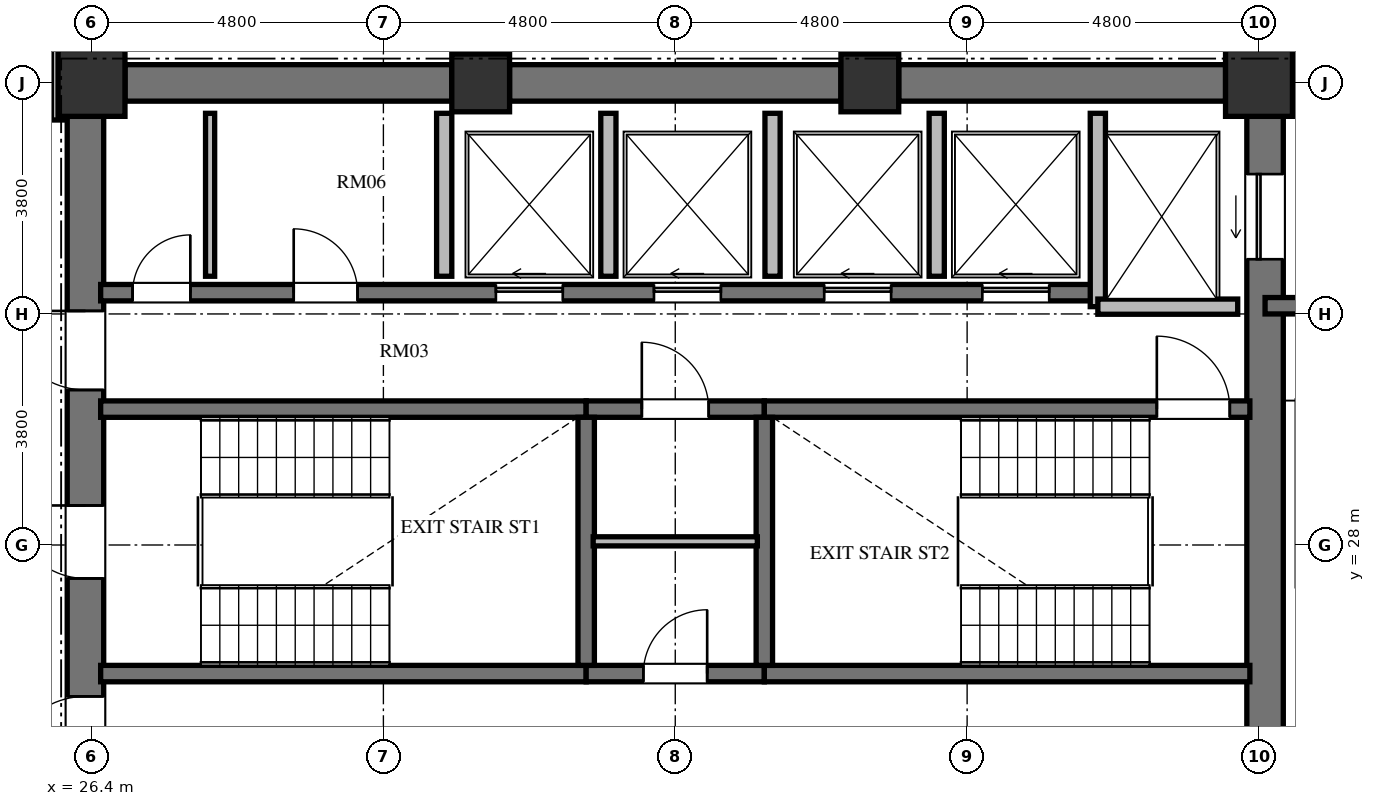
"""IFC4 building model, lengths in metres.
Left out: names, types, materials, properties, quantities, classifications, styles, units other than length and angle.
Written with IfcOpenShell. Run it as: python <this file> out.ifc"""

import sys

from ifc_helpers import new_model, si_unit, direction, frame, frame_2d, origin, origin_2d, place, context, subcontext, project, spatial, rectangle, extrude, element, fill, save


model = new_model("IFC4")
c1 = context("Model", 3, precision=1e-05, world=origin(), true_north=direction((0.0, 1.0)))
c2 = subcontext(c1, "Body", "Model", "MODEL_VIEW")
j1 = project(units=[si_unit("LENGTHUNIT", "METRE"), si_unit("PLANEANGLEUNIT", "RADIAN")], contexts=[c1])
p1 = place(None, origin())
s1 = spatial("IfcSite", under=j1, at=p1, CompositionType="ELEMENT")
p2 = place(p1, origin())
s2 = spatial("IfcBuilding", under=s1, at=p2, CompositionType="ELEMENT")
p3 = place(p2, frame((0.0, 0.0, 156.528)))
s3 = spatial("IfcBuildingStorey", under=s2, at=p3, CompositionType="ELEMENT", Elevation=156.528)
p4 = place(p3, frame((45.6, 35.6, 0.0), z_axis=(0.0, 0.0, 1.0), x_axis=(1.0, 0.0, 0.0)))
e1 = element("IfcColumn", 1, at=p4, inside=s3, PredefinedType="COLUMN", context=c2, shape_type="SweptSolid", body=[
    extrude(rectangle(XDim=1.1, YDim=1.1, at=origin_2d()), origin(), (0.0, 0.0, 1.0), 3.648),
])
for number, where, z_axis, x_axis in (
    (2, (39.2, 35.6, 0.0), (0.0, 0.0, 1.0), (1.0, 0.0, 0.0)),
    (3, (32.8, 35.6, 0.0), (0.0, 0.0, 1.0), (1.0, 0.0, 0.0)),
):
    element("IfcColumn", number, at=place(p3, frame(where, z_axis=z_axis, x_axis=x_axis)), inside=s3, PredefinedType="COLUMN", context=c2, shape_type="SweptSolid", body=[
        extrude(rectangle(XDim=0.95, YDim=0.95, at=origin_2d()), origin(), (0.0, 0.0, 1.0), 3.648),
    ])
p5 = place(p3, frame((26.4, 35.6, 0.0), z_axis=(0.0, 0.0, 1.0), x_axis=(1.0, 0.0, 0.0)))
e4 = element("IfcColumn", 4, at=p5, inside=s3, PredefinedType="COLUMN", context=c2, shape_type="SweptSolid", body=[
    extrude(rectangle(XDim=1.1, YDim=1.1, at=origin_2d()), origin(), (0.0, 0.0, 1.0), 3.648),
])
p6 = place(p3, frame((26.3, 20.95, 0.0), z_axis=(0.0, 0.0, 1.0), x_axis=(0.0, 1.0, 0.0)))
e5 = element("IfcWall", 5, at=p6, inside=s3, PredefinedType="SHEAR", context=c2, shape_type="SweptSolid", body=[
    extrude(rectangle(XDim=14.1, YDim=0.6, at=frame_2d((7.05, 0.0))), origin(), (0.0, 0.0, 1.0), 3.648),
])
p7 = place(p6, frame((6.5, 0.0, 0.0)))
e6 = element("IfcOpeningElement", 6, at=p7, cuts=e5, PredefinedType="OPENING", context=c2, shape_type="SweptSolid", body=[
    extrude(rectangle(XDim=1.2, YDim=2.15, at=frame_2d((0.6, 1.075))), frame((0.0, 0.31, 0.0), z_axis=(0.0, -1.0, 0.0), x_axis=(1.0, 0.0, 0.0)), (0.0, 0.0, 1.0), 0.62),
])
p8 = place(p6, frame((9.6, 0.0, 0.0)))
e7 = element("IfcOpeningElement", 7, at=p8, cuts=e5, PredefinedType="OPENING", context=c2, shape_type="SweptSolid", body=[
    extrude(rectangle(XDim=1.3, YDim=2.2, at=frame_2d((0.65, 1.1))), frame((0.0, 0.31, 0.0), z_axis=(0.0, -1.0, 0.0), x_axis=(1.0, 0.0, 0.0)), (0.0, 0.0, 1.0), 0.62),
])
p9 = place(p6, frame((3.26, 0.0, 0.0)))
e8 = element("IfcOpeningElement", 8, at=p9, cuts=e5, PredefinedType="OPENING", context=c2, shape_type="SweptSolid", body=[
    extrude(rectangle(XDim=1.3, YDim=2.2, at=frame_2d((0.65, 1.1))), frame((0.0, 0.31, 0.0), z_axis=(0.0, -1.0, 0.0), x_axis=(1.0, 0.0, 0.0)), (0.0, 0.0, 1.0), 0.62),
])
p10 = place(p3, frame((45.7, 20.95, 0.0), z_axis=(0.0, 0.0, 1.0), x_axis=(0.0, 1.0, 0.0)))
e9 = element("IfcWall", 9, at=p10, inside=s3, PredefinedType="SHEAR", context=c2, shape_type="SweptSolid", body=[
    extrude(rectangle(XDim=14.1, YDim=0.6, at=frame_2d((7.05, 0.0))), origin(), (0.0, 0.0, 1.0), 3.648),
])
p11 = place(p10, frame((11.75, 0.0, 0.0)))
e10 = element("IfcOpeningElement", 10, at=p11, cuts=e9, PredefinedType="OPENING", context=c2, shape_type="SweptSolid", body=[
    extrude(rectangle(XDim=1.4, YDim=2.3, at=frame_2d((0.7, 1.15))), frame((0.0, 0.31, 0.0), z_axis=(0.0, -1.0, 0.0), x_axis=(1.0, 0.0, 0.0)), (0.0, 0.0, 1.0), 0.62),
])
p12 = place(p10, frame((0.95, 0.0, 0.0)))
e11 = element("IfcOpeningElement", 11, at=p12, cuts=e9, PredefinedType="OPENING", context=c2, shape_type="SweptSolid", body=[
    extrude(rectangle(XDim=1.4, YDim=2.3, at=frame_2d((0.7, 1.15))), frame((0.0, 0.31, 0.0), z_axis=(0.0, -1.0, 0.0), x_axis=(1.0, 0.0, 0.0)), (0.0, 0.0, 1.0), 0.62),
])
p13 = place(p3, frame((26.95, 35.6, 0.0), z_axis=(0.0, 0.0, 1.0), x_axis=(1.0, 0.0, 0.0)))
e12 = element("IfcWall", 12, at=p13, inside=s3, PredefinedType="SHEAR", context=c2, shape_type="SweptSolid", body=[
    extrude(rectangle(XDim=5.375, YDim=0.6, at=frame_2d((2.688, 0.0))), origin(), (0.0, 0.0, 1.0), 3.648),
])
p14 = place(p3, frame((33.275, 35.6, 0.0), z_axis=(0.0, 0.0, 1.0), x_axis=(1.0, 0.0, 0.0)))
e13 = element("IfcWall", 13, at=p14, inside=s3, PredefinedType="SHEAR", context=c2, shape_type="SweptSolid", body=[
    extrude(rectangle(XDim=5.45, YDim=0.6, at=frame_2d((2.725, 0.0))), origin(), (0.0, 0.0, 1.0), 3.648),
])
p15 = place(p3, frame((39.675, 35.6, 0.0), z_axis=(0.0, 0.0, 1.0), x_axis=(1.0, 0.0, 0.0)))
e14 = element("IfcWall", 14, at=p15, inside=s3, PredefinedType="SHEAR", context=c2, shape_type="SweptSolid", body=[
    extrude(rectangle(XDim=5.375, YDim=0.6, at=frame_2d((2.688, 0.0))), origin(), (0.0, 0.0, 1.0), 3.648),
])
p16 = place(p3, frame((26.55, 30.235, 0.0), z_axis=(0.0, 0.0, 1.0), x_axis=(1.0, 0.0, 0.0)))
e15 = element("IfcWall", 15, at=p16, inside=s3, PredefinedType="SHEAR", context=c2, shape_type="SweptSolid", body=[
    extrude(rectangle(XDim=7.985, YDim=0.27, at=frame_2d((3.992, 0.0))), origin(), (0.0, 0.0, 1.0), 3.648),
])
p17 = place(p3, frame((34.535, 30.235, 0.0), z_axis=(0.0, 0.0, 1.0), x_axis=(1.0, 0.0, 0.0)))
e16 = element("IfcWall", 16, at=p17, inside=s3, PredefinedType="SHEAR", context=c2, shape_type="SweptSolid", body=[
    extrude(rectangle(XDim=2.93, YDim=0.27, at=frame_2d((1.465, 0.0))), origin(), (0.0, 0.0, 1.0), 3.648),
])
p18 = place(p17, frame((0.915, 0.0, 0.0)))
e17 = element("IfcOpeningElement", 17, at=p18, cuts=e16, PredefinedType="OPENING", context=c2, shape_type="SweptSolid", body=[
    extrude(rectangle(XDim=1.1, YDim=2.15, at=frame_2d((0.55, 1.075))), frame((0.0, 0.145, 0.0), z_axis=(0.0, -1.0, 0.0), x_axis=(1.0, 0.0, 0.0)), (0.0, 0.0, 1.0), 0.29),
])
p19 = place(p3, frame((37.465, 30.235, 0.0), z_axis=(0.0, 0.0, 1.0), x_axis=(1.0, 0.0, 0.0)))
e18 = element("IfcWall", 18, at=p19, inside=s3, PredefinedType="SHEAR", context=c2, shape_type="SweptSolid", body=[
    extrude(rectangle(XDim=7.985, YDim=0.27, at=frame_2d((3.992, 0.0))), origin(), (0.0, 0.0, 1.0), 3.648),
])
p20 = place(p19, frame((6.455, 0.0, 0.0)))
e19 = element("IfcOpeningElement", 19, at=p20, cuts=e18, PredefinedType="OPENING", context=c2, shape_type="SweptSolid", body=[
    extrude(rectangle(XDim=1.2, YDim=2.15, at=frame_2d((0.6, 1.075))), frame((0.0, 0.145, 0.0), z_axis=(0.0, -1.0, 0.0), x_axis=(1.0, 0.0, 0.0)), (0.0, 0.0, 1.0), 0.29),
])
p21 = place(p3, frame((26.55, 25.885, 0.0), z_axis=(0.0, 0.0, 1.0), x_axis=(1.0, 0.0, 0.0)))
e20 = element("IfcWall", 20, at=p21, inside=s3, PredefinedType="SHEAR", context=c2, shape_type="SweptSolid", body=[
    extrude(rectangle(XDim=7.985, YDim=0.27, at=frame_2d((3.992, 0.0))), origin(), (0.0, 0.0, 1.0), 3.648),
])
p22 = place(p3, frame((34.535, 25.885, 0.0), z_axis=(0.0, 0.0, 1.0), x_axis=(1.0, 0.0, 0.0)))
e21 = element("IfcWall", 21, at=p22, inside=s3, PredefinedType="SHEAR", context=c2, shape_type="SweptSolid", body=[
    extrude(rectangle(XDim=2.93, YDim=0.27, at=frame_2d((1.465, 0.0))), origin(), (0.0, 0.0, 1.0), 3.648),
])
p23 = place(p22, frame((0.94, 0.0, 0.0)))
e22 = element("IfcOpeningElement", 22, at=p23, cuts=e21, PredefinedType="OPENING", context=c2, shape_type="SweptSolid", body=[
    extrude(rectangle(XDim=1.05, YDim=2.15, at=frame_2d((0.525, 1.075))), frame((0.0, 0.145, 0.0), z_axis=(0.0, -1.0, 0.0), x_axis=(1.0, 0.0, 0.0)), (0.0, 0.0, 1.0), 0.29),
])
p24 = place(p3, frame((37.465, 25.885, 0.0), z_axis=(0.0, 0.0, 1.0), x_axis=(1.0, 0.0, 0.0)))
e23 = element("IfcWall", 23, at=p24, inside=s3, PredefinedType="SHEAR", context=c2, shape_type="SweptSolid", body=[
    extrude(rectangle(XDim=7.985, YDim=0.27, at=frame_2d((3.992, 0.0))), origin(), (0.0, 0.0, 1.0), 3.648),
])
for number, where, z_axis, x_axis in (
    (24, (34.535, 26.02, 0.0), (0.0, 0.0, 1.0), (0.0, 1.0, 0.0)),
    (25, (37.465, 26.02, 0.0), (0.0, 0.0, 1.0), (0.0, 1.0, 0.0)),
):
    element("IfcWall", number, at=place(p3, frame(where, z_axis=z_axis, x_axis=x_axis)), inside=s3, PredefinedType="SHEAR", context=c2, shape_type="SweptSolid", body=[
        extrude(rectangle(XDim=4.08, YDim=0.27, at=frame_2d((2.04, 0.0))), origin(), (0.0, 0.0, 1.0), 3.648),
    ])
p25 = place(p3, frame((34.65, 28.06, 0.0), z_axis=(0.0, 0.0, 1.0), x_axis=(1.0, 0.0, 0.0)))
e26 = element("IfcWall", 26, at=p25, inside=s3, PredefinedType="PARTITIONING", context=c2, shape_type="SweptSolid", body=[
    extrude(rectangle(XDim=2.7, YDim=0.15, at=frame_2d((1.35, 0.0))), origin(), (0.0, 0.0, 1.0), 3.428),
])
p26 = place(p3, frame((26.55, 32.15, 0.0), z_axis=(0.0, 0.0, 1.0), x_axis=(1.0, 0.0, 0.0)))
e27 = element("IfcWall", 27, at=p26, inside=s3, PredefinedType="SHEAR", context=c2, shape_type="SweptSolid", body=[
    extrude(rectangle(XDim=16.4, YDim=0.27, at=frame_2d((8.2, 0.0))), origin(), (0.0, 0.0, 1.0), 3.648),
])
p27 = place(p26, frame((0.525, 0.0, 0.0)))
e28 = element("IfcOpeningElement", 28, at=p27, cuts=e27, PredefinedType="OPENING", context=c2, shape_type="SweptSolid", body=[
    extrude(rectangle(XDim=0.95, YDim=2.1, at=frame_2d((0.475, 1.05))), frame((0.0, 0.145, 0.0), z_axis=(0.0, -1.0, 0.0), x_axis=(1.0, 0.0, 0.0)), (0.0, 0.0, 1.0), 0.29),
])
p28 = place(p26, frame((3.175, 0.0, 0.0)))
e29 = element("IfcOpeningElement", 29, at=p28, cuts=e27, PredefinedType="OPENING", context=c2, shape_type="SweptSolid", body=[
    extrude(rectangle(XDim=1.05, YDim=2.15, at=frame_2d((0.525, 1.075))), frame((0.0, 0.145, 0.0), z_axis=(0.0, -1.0, 0.0), x_axis=(1.0, 0.0, 0.0)), (0.0, 0.0, 1.0), 0.29),
])
p29 = place(p26, frame((6.5, 0.0, 0.0)))
e30 = element("IfcOpeningElement", 30, at=p29, cuts=e27, PredefinedType="OPENING", context=c2, shape_type="SweptSolid", body=[
    extrude(rectangle(XDim=1.1, YDim=2.2, at=frame_2d((0.55, 1.1))), frame((0.0, 0.145, 0.0), z_axis=(0.0, -1.0, 0.0), x_axis=(1.0, 0.0, 0.0)), (0.0, 0.0, 1.0), 0.29),
])
p30 = place(p26, frame((9.1, 0.0, 0.0)))
e31 = element("IfcOpeningElement", 31, at=p30, cuts=e27, PredefinedType="OPENING", context=c2, shape_type="SweptSolid", body=[
    extrude(rectangle(XDim=1.1, YDim=2.2, at=frame_2d((0.55, 1.1))), frame((0.0, 0.145, 0.0), z_axis=(0.0, -1.0, 0.0), x_axis=(1.0, 0.0, 0.0)), (0.0, 0.0, 1.0), 0.29),
])
p31 = place(p26, frame((11.9, 0.0, 0.0)))
e32 = element("IfcOpeningElement", 32, at=p31, cuts=e27, PredefinedType="OPENING", context=c2, shape_type="SweptSolid", body=[
    extrude(rectangle(XDim=1.1, YDim=2.2, at=frame_2d((0.55, 1.1))), frame((0.0, 0.145, 0.0), z_axis=(0.0, -1.0, 0.0), x_axis=(1.0, 0.0, 0.0)), (0.0, 0.0, 1.0), 0.29),
])
p32 = place(p26, frame((14.5, 0.0, 0.0)))
e33 = element("IfcOpeningElement", 33, at=p32, cuts=e27, PredefinedType="OPENING", context=c2, shape_type="SweptSolid", body=[
    extrude(rectangle(XDim=1.1, YDim=2.2, at=frame_2d((0.55, 1.1))), frame((0.0, 0.145, 0.0), z_axis=(0.0, -1.0, 0.0), x_axis=(1.0, 0.0, 0.0)), (0.0, 0.0, 1.0), 0.29),
])
p33 = place(p3, frame((42.95, 31.92, 0.0), z_axis=(0.0, 0.0, 1.0), x_axis=(0.0, 1.0, 0.0)))
e34 = element("IfcWall", 34, at=p33, inside=s3, PredefinedType="SOLIDWALL", context=c2, shape_type="SweptSolid", body=[
    extrude(rectangle(XDim=3.18, YDim=0.25, at=frame_2d((1.59, 0.0))), origin(), (0.0, 0.0, 1.0), 3.428),
])
p34 = place(p3, frame((42.95, 31.92, 0.0), z_axis=(0.0, 0.0, 1.0), x_axis=(1.0, 0.0, 0.0)))
e35 = element("IfcWall", 35, at=p34, inside=s3, PredefinedType="SOLIDWALL", context=c2, shape_type="SweptSolid", body=[
    extrude(rectangle(XDim=2.3, YDim=0.25, at=frame_2d((1.15, 0.0))), origin(), (0.0, 0.0, 1.0), 3.428),
])
for number, where, z_axis, x_axis in (
    (36, (32.2, 32.42, 0.0), (0.0, 0.0, 1.0), (0.0, 1.0, 0.0)),
    (37, (34.9, 32.42, 0.0), (0.0, 0.0, 1.0), (0.0, 1.0, 0.0)),
    (38, (37.6, 32.42, 0.0), (0.0, 0.0, 1.0), (0.0, 1.0, 0.0)),
    (39, (40.3, 32.42, 0.0), (0.0, 0.0, 1.0), (0.0, 1.0, 0.0)),
):
    element("IfcWall", number, at=place(p3, frame(where, z_axis=z_axis, x_axis=x_axis)), inside=s3, PredefinedType="SOLIDWALL", context=c2, shape_type="SweptSolid", body=[
        extrude(rectangle(XDim=2.68, YDim=0.25, at=frame_2d((1.34, 0.0))), origin(), (0.0, 0.0, 1.0), 3.428),
    ])
p35 = place(p3, frame((28.35, 32.42, 0.0), z_axis=(0.0, 0.0, 1.0), x_axis=(0.0, 1.0, 0.0)))
e40 = element("IfcWall", 40, at=p35, inside=s3, PredefinedType="PARTITIONING", context=c2, shape_type="SweptSolid", body=[
    extrude(rectangle(XDim=2.68, YDim=0.15, at=frame_2d((1.34, 0.0))), origin(), (0.0, 0.0, 1.0), 3.428),
])
p36 = place(p3, frame((46.0, 35.98, 0.0), z_axis=(0.0, 0.0, 1.0), x_axis=(1.0, 0.0, 0.0)))
e41 = element("IfcWall", 41, at=p36, inside=s3, PredefinedType="SHEAR", context=c2, shape_type="SweptSolid", body=[
    extrude(rectangle(XDim=4.55, YDim=0.27, at=frame_2d((2.275, 0.0))), origin(), (0.0, 0.0, 1.0), 3.648),
])
p37 = place(p3, frame((45.7, 31.935, 0.0), z_axis=(0.0, 0.0, 1.0), x_axis=(1.0, 0.0, 0.0)))
e42 = element("IfcWall", 42, at=p37, inside=s3, PredefinedType="SHEAR", context=c2, shape_type="SweptSolid", body=[
    extrude(rectangle(XDim=4.715, YDim=0.27, at=frame_2d((2.357, 0.0))), origin(), (0.0, 0.0, 1.0), 3.648),
])
p38 = place(p3, frame((25.83, 36.21, 0.0), z_axis=(0.0, 0.0, 1.0), x_axis=(0.0, -1.0, 0.0)))
e43 = element("IfcWall", 43, at=p38, inside=s3, PredefinedType="PARTITIONING", context=c2, shape_type="SweptSolid", body=[
    extrude(rectangle(XDim=1.22, YDim=0.18, at=frame_2d((0.61, 0.0))), origin(), (0.0, 0.0, 1.0), 3.428),
])
p39 = place(p7, origin())
e44 = element("IfcDoor", 44, at=p39, inside=s3, OperationType="SINGLE_SWING_RIGHT", PredefinedType="DOOR", context=c2, shape_type="SweptSolid", body=[
    extrude(rectangle(XDim=1.2, YDim=2.15, at=frame_2d((0.6, 1.075))), frame((0.0, 0.025, 0.0), z_axis=(0.0, -1.0, 0.0), x_axis=(1.0, 0.0, 0.0)), (0.0, 0.0, 1.0), 0.05),
])
fill(e6, e44)
p40 = place(p20, origin())
e45 = element("IfcDoor", 45, at=p40, inside=s3, OperationType="SINGLE_SWING_LEFT", PredefinedType="DOOR", context=c2, shape_type="SweptSolid", body=[
    extrude(rectangle(XDim=1.2, YDim=2.15, at=frame_2d((0.6, 1.075))), frame((0.0, 0.025, 0.0), z_axis=(0.0, -1.0, 0.0), x_axis=(1.0, 0.0, 0.0)), (0.0, 0.0, 1.0), 0.05),
])
fill(e19, e45)
p41 = place(p23, origin())
e46 = element("IfcDoor", 46, at=p41, inside=s3, OperationType="SINGLE_SWING_RIGHT", PredefinedType="DOOR", context=c2, shape_type="SweptSolid", body=[
    extrude(rectangle(XDim=1.05, YDim=2.15, at=frame_2d((0.525, 1.075))), frame((0.0, 0.025, 0.0), z_axis=(0.0, -1.0, 0.0), x_axis=(1.0, 0.0, 0.0)), (0.0, 0.0, 1.0), 0.05),
])
fill(e22, e46)
p42 = place(p18, origin())
e47 = element("IfcDoor", 47, at=p42, inside=s3, OperationType="SINGLE_SWING_LEFT", PredefinedType="DOOR", context=c2, shape_type="SweptSolid", body=[
    extrude(rectangle(XDim=1.1, YDim=2.15, at=frame_2d((0.55, 1.075))), frame((0.0, 0.025, 0.0), z_axis=(0.0, -1.0, 0.0), x_axis=(1.0, 0.0, 0.0)), (0.0, 0.0, 1.0), 0.05),
])
fill(e17, e47)
p43 = place(p8, origin())
e48 = element("IfcDoor", 48, at=p43, inside=s3, OperationType="SINGLE_SWING_RIGHT", PredefinedType="DOOR", context=c2, shape_type="SweptSolid", body=[
    extrude(rectangle(XDim=1.3, YDim=2.2, at=frame_2d((0.65, 1.1))), frame((0.0, 0.025, 0.0), z_axis=(0.0, -1.0, 0.0), x_axis=(1.0, 0.0, 0.0)), (0.0, 0.0, 1.0), 0.05),
])
fill(e7, e48)
p44 = place(p9, origin())
e49 = element("IfcDoor", 49, at=p44, inside=s3, OperationType="SINGLE_SWING_LEFT", PredefinedType="DOOR", context=c2, shape_type="SweptSolid", body=[
    extrude(rectangle(XDim=1.3, YDim=2.2, at=frame_2d((0.65, 1.1))), frame((0.0, 0.025, 0.0), z_axis=(0.0, -1.0, 0.0), x_axis=(1.0, 0.0, 0.0)), (0.0, 0.0, 1.0), 0.05),
])
fill(e8, e49)
p45 = place(p27, origin())
e50 = element("IfcDoor", 50, at=p45, inside=s3, OperationType="SINGLE_SWING_RIGHT", PredefinedType="DOOR", context=c2, shape_type="SweptSolid", body=[
    extrude(rectangle(XDim=0.95, YDim=2.1, at=frame_2d((0.475, 1.05))), frame((0.0, 0.025, 0.0), z_axis=(0.0, -1.0, 0.0), x_axis=(1.0, 0.0, 0.0)), (0.0, 0.0, 1.0), 0.05),
])
fill(e28, e50)
p46 = place(p28, origin())
e51 = element("IfcDoor", 51, at=p46, inside=s3, OperationType="SINGLE_SWING_LEFT", PredefinedType="DOOR", context=c2, shape_type="SweptSolid", body=[
    extrude(rectangle(XDim=1.05, YDim=2.15, at=frame_2d((0.525, 1.075))), frame((0.0, 0.025, 0.0), z_axis=(0.0, -1.0, 0.0), x_axis=(1.0, 0.0, 0.0)), (0.0, 0.0, 1.0), 0.05),
])
fill(e29, e51)
p47 = place(p29, origin())
e52 = element("IfcDoor", 52, at=p47, inside=s3, OperationType="SLIDING_TO_LEFT", PredefinedType="DOOR", context=c2, shape_type="SweptSolid", body=[
    extrude(rectangle(XDim=1.1, YDim=2.2, at=frame_2d((0.55, 1.1))), frame((0.0, 0.025, 0.0), z_axis=(0.0, -1.0, 0.0), x_axis=(1.0, 0.0, 0.0)), (0.0, 0.0, 1.0), 0.05),
])
fill(e30, e52)
p48 = place(p30, origin())
e53 = element("IfcDoor", 53, at=p48, inside=s3, OperationType="SLIDING_TO_LEFT", PredefinedType="DOOR", context=c2, shape_type="SweptSolid", body=[
    extrude(rectangle(XDim=1.1, YDim=2.2, at=frame_2d((0.55, 1.1))), frame((0.0, 0.025, 0.0), z_axis=(0.0, -1.0, 0.0), x_axis=(1.0, 0.0, 0.0)), (0.0, 0.0, 1.0), 0.05),
])
fill(e31, e53)
p49 = place(p31, origin())
e54 = element("IfcDoor", 54, at=p49, inside=s3, OperationType="SLIDING_TO_LEFT", PredefinedType="DOOR", context=c2, shape_type="SweptSolid", body=[
    extrude(rectangle(XDim=1.1, YDim=2.2, at=frame_2d((0.55, 1.1))), frame((0.0, 0.025, 0.0), z_axis=(0.0, -1.0, 0.0), x_axis=(1.0, 0.0, 0.0)), (0.0, 0.0, 1.0), 0.05),
])
fill(e32, e54)
p50 = place(p32, origin())
e55 = element("IfcDoor", 55, at=p50, inside=s3, OperationType="SLIDING_TO_LEFT", PredefinedType="DOOR", context=c2, shape_type="SweptSolid", body=[
    extrude(rectangle(XDim=1.1, YDim=2.2, at=frame_2d((0.55, 1.1))), frame((0.0, 0.025, 0.0), z_axis=(0.0, -1.0, 0.0), x_axis=(1.0, 0.0, 0.0)), (0.0, 0.0, 1.0), 0.05),
])
fill(e33, e55)
p51 = place(p11, origin())
e56 = element("IfcDoor", 56, at=p51, inside=s3, OperationType="SLIDING_TO_LEFT", PredefinedType="DOOR", context=c2, shape_type="SweptSolid", body=[
    extrude(rectangle(XDim=1.4, YDim=2.3, at=frame_2d((0.7, 1.15))), frame((0.0, 0.025, 0.0), z_axis=(0.0, -1.0, 0.0), x_axis=(1.0, 0.0, 0.0)), (0.0, 0.0, 1.0), 0.05),
])
fill(e10, e56)
save(model, sys.argv[1])
